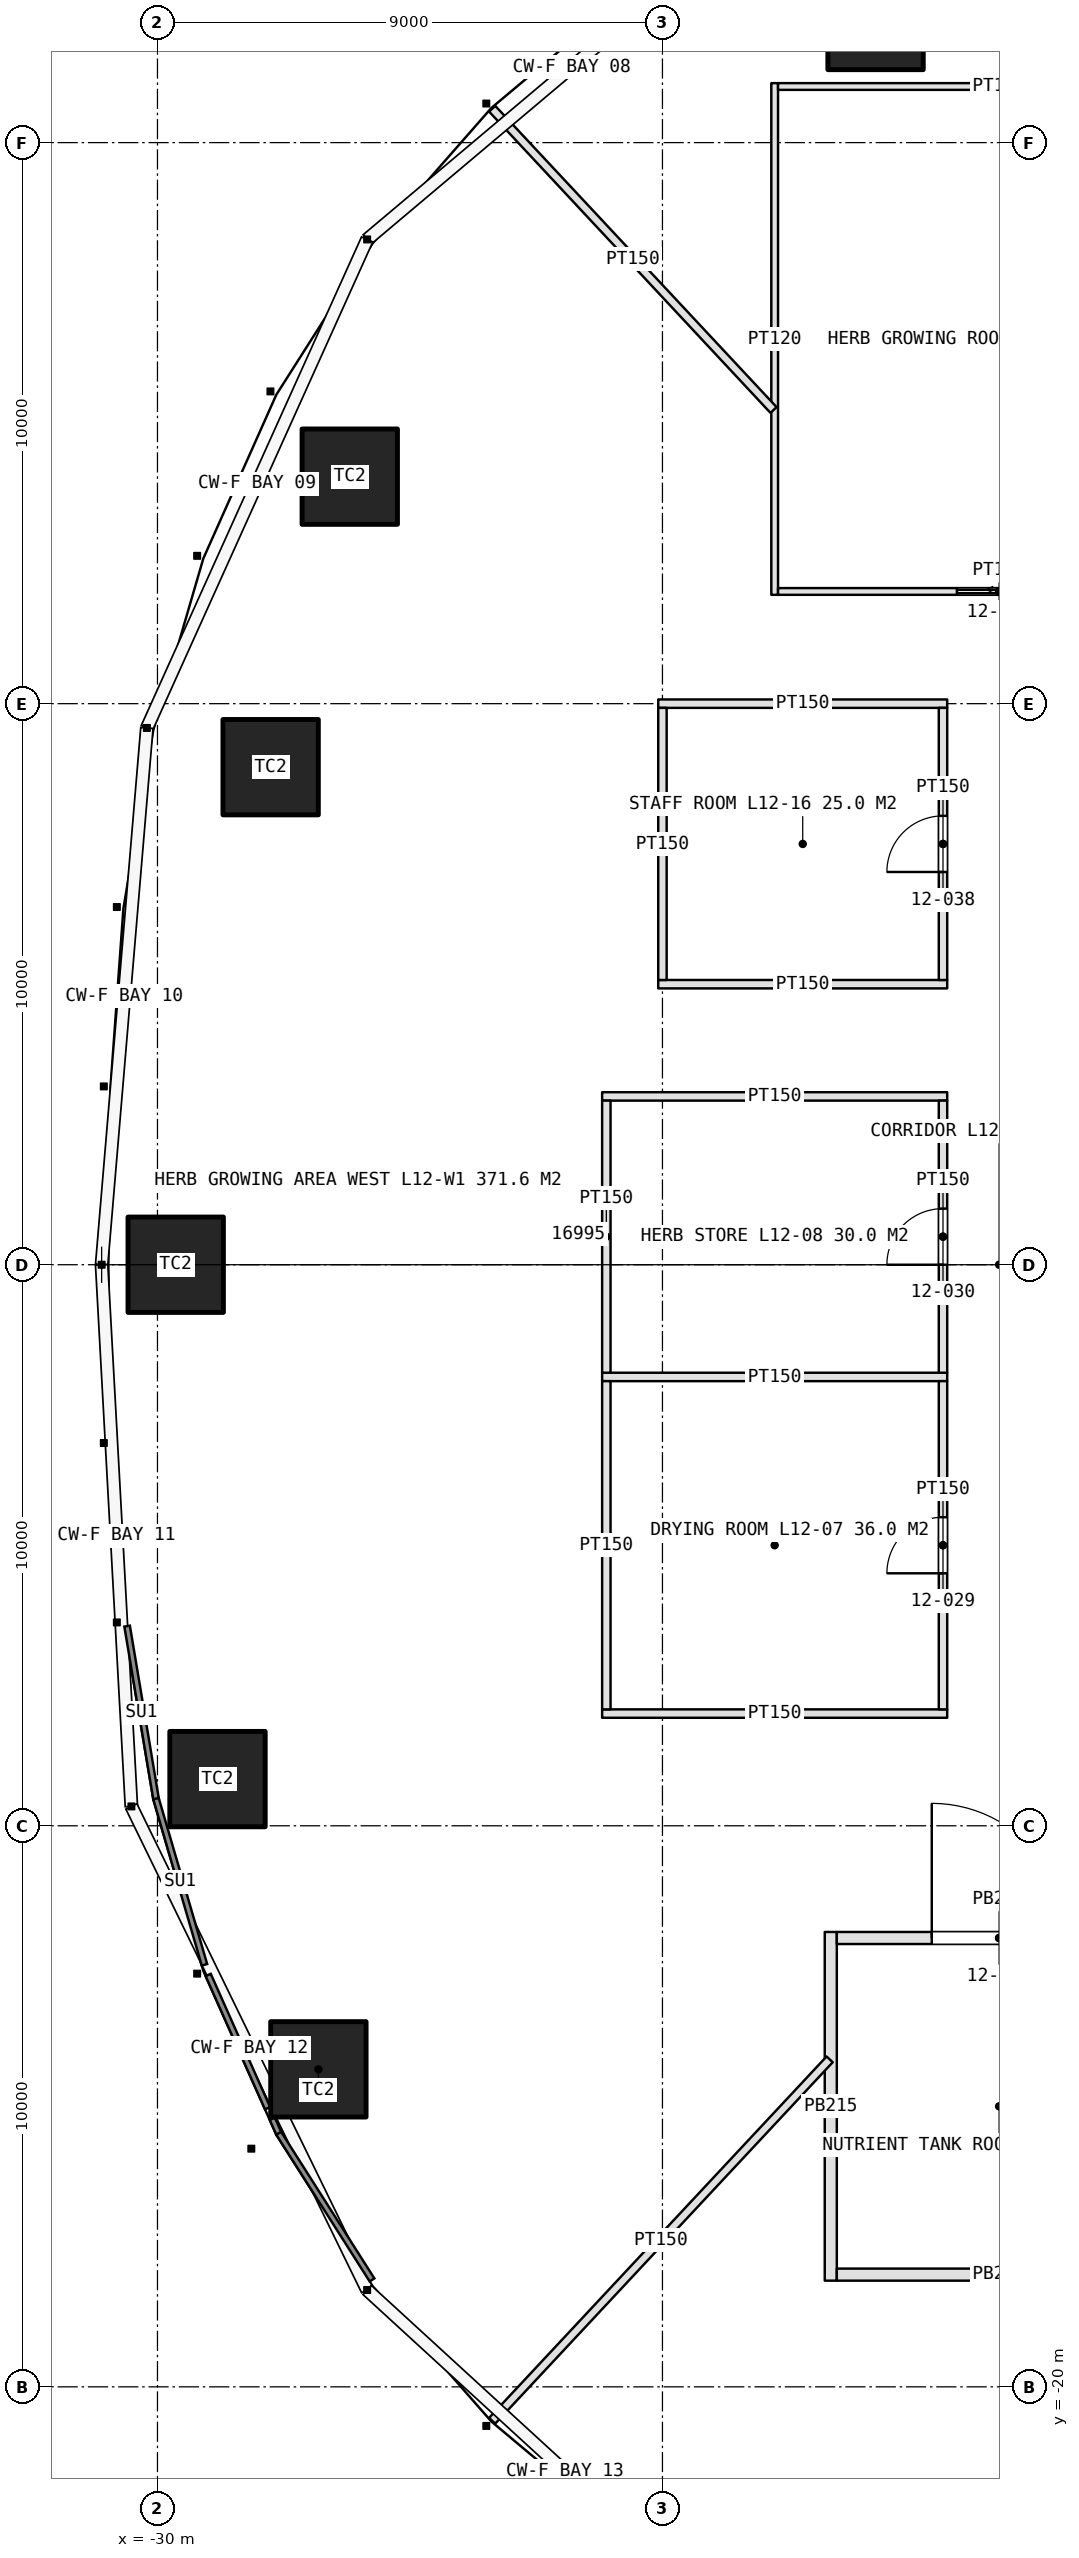
"""IFC4 building model, lengths in metres.
Left out: names, types, materials, properties, quantities, classifications, styles, units other than length and angle.
Written with IfcOpenShell. Run it as: python <this file> out.ifc"""

import sys

from ifc_helpers import new_model, si_unit, direction, frame, frame_2d, origin, origin_2d, place, context, subcontext, project, spatial, rectangle, extrude, element, fill, save


model = new_model("IFC4")
c1 = context("Model", 3, precision=1e-05, world=origin(), true_north=direction((0.0, 1.0)))
c2 = subcontext(c1, "Body", "Model", "MODEL_VIEW")
j1 = project(units=[si_unit("LENGTHUNIT", "METRE"), si_unit("PLANEANGLEUNIT", "RADIAN")], contexts=[c1])
p1 = place(None, origin())
s1 = spatial("IfcSite", under=j1, at=p1, CompositionType="ELEMENT")
p2 = place(p1, origin())
s2 = spatial("IfcBuilding", under=s1, at=p2, CompositionType="ELEMENT")
p3 = place(p2, frame((0.0, 0.0, 60.0)))
s3 = spatial("IfcBuildingStorey", under=s2, at=p3, CompositionType="ELEMENT", Elevation=60.0)
for number, where, z_axis, x_axis in (
    (1, (-17.202, 22.15, 0.0), (0.0, 0.0, 1.0), (1.0, 0.0, 0.0)),
    (2, (-26.573, 14.046, 0.0), (0.0, 0.0, 1.0), (1.0, 0.0, 0.0)),
    (3, (-27.983, 8.868, 0.0), (0.0, 0.0, 1.0), (1.0, 0.0, 0.0)),
    (4, (-29.675, 0.0, 0.0), (0.0, 0.0, 1.0), (1.0, 0.0, 0.0)),
    (5, (-28.93, -9.168, 0.0), (0.0, 0.0, 1.0), (1.0, 0.0, 0.0)),
    (6, (-27.132, -14.341, 0.0), (0.0, 0.0, 1.0), (1.0, 0.0, 0.0)),
):
    element("IfcColumn", number, at=place(p3, frame(where, z_axis=z_axis, x_axis=x_axis)), inside=s3, PredefinedType="COLUMN", context=c2, shape_type="SweptSolid", body=[
        extrude(rectangle(XDim=1.7, YDim=1.7, at=origin_2d()), origin(), (0.0, 0.0, 1.0), 5.0),
    ])
p4 = place(p3, frame((-19.0, 11.94, 0.0), z_axis=(0.0, 0.0, 1.0), x_axis=(0.0, 1.0, 0.0)))
e7 = element("IfcWall", 7, at=p4, inside=s3, PredefinedType="PARTITIONING", context=c2, shape_type="SweptSolid", body=[
    extrude(rectangle(XDim=9.12, YDim=0.12, at=frame_2d((4.56, 0.0))), origin(), (0.0, 0.0, 1.0), 3.6),
])
p5 = place(p3, frame((-18.94, 12.0, 0.0), z_axis=(0.0, 0.0, 1.0), x_axis=(1.0, 0.0, 0.0)))
e8 = element("IfcWall", 8, at=p5, inside=s3, PredefinedType="PARTITIONING", context=c2, shape_type="SweptSolid", body=[
    extrude(rectangle(XDim=7.88, YDim=0.12, at=frame_2d((3.94, 0.0))), origin(), (0.0, 0.0, 1.0), 3.6),
])
p6 = place(p5, frame((3.19, 0.0, 0.0)))
e9 = element("IfcOpeningElement", 9, at=p6, cuts=e8, PredefinedType="OPENING", context=c2, shape_type="SweptSolid", body=[
    extrude(rectangle(XDim=1.5, YDim=2.5, at=frame_2d((0.75, 1.25))), frame((0.0, 0.07, 0.0), z_axis=(0.0, -1.0, 0.0), x_axis=(1.0, 0.0, 0.0)), (0.0, 0.0, 1.0), 0.14),
])
p7 = place(p3, frame((-18.94, 21.0, 0.0), z_axis=(0.0, 0.0, 1.0), x_axis=(1.0, 0.0, 0.0)))
e10 = element("IfcWall", 10, at=p7, inside=s3, PredefinedType="PARTITIONING", context=c2, shape_type="SweptSolid", body=[
    extrude(rectangle(XDim=7.88, YDim=0.12, at=frame_2d((3.94, 0.0))), origin(), (0.0, 0.0, 1.0), 3.6),
])
for number, where, z_axis, x_axis in (
    (11, (-15.925, -8.0, 0.0), (0.0, 0.0, 1.0), (-1.0, 0.0, 0.0)),
    (12, (-15.925, -2.0, 0.0), (0.0, 0.0, 1.0), (-1.0, 0.0, 0.0)),
    (13, (-15.925, 3.0, 0.0), (0.0, 0.0, 1.0), (-1.0, 0.0, 0.0)),
):
    element("IfcWall", number, at=place(p3, frame(where, z_axis=z_axis, x_axis=x_axis)), inside=s3, PredefinedType="PARTITIONING", context=c2, shape_type="SweptSolid", body=[
        extrude(rectangle(XDim=6.15, YDim=0.15, at=frame_2d((3.075, 0.0))), origin(), (0.0, 0.0, 1.0), 3.6),
    ])
p8 = place(p3, frame((-16.0, -7.925, 0.0), z_axis=(0.0, 0.0, 1.0), x_axis=(0.0, 1.0, 0.0)))
e14 = element("IfcWall", 14, at=p8, inside=s3, PredefinedType="PARTITIONING", context=c2, shape_type="SweptSolid", body=[
    extrude(rectangle(XDim=5.85, YDim=0.15, at=frame_2d((2.925, 0.0))), origin(), (0.0, 0.0, 1.0), 3.6),
])
p9 = place(p8, frame((2.425, 0.0, 0.0)))
e15 = element("IfcOpeningElement", 15, at=p9, cuts=e14, PredefinedType="OPENING", context=c2, shape_type="SweptSolid", body=[
    extrude(rectangle(XDim=1.0, YDim=2.2, at=frame_2d((0.5, 1.1))), frame((0.0, 0.085, 0.0), z_axis=(0.0, -1.0, 0.0), x_axis=(1.0, 0.0, 0.0)), (0.0, 0.0, 1.0), 0.17),
])
p10 = place(p3, frame((-22.0, -7.925, 0.0), z_axis=(0.0, 0.0, 1.0), x_axis=(0.0, 1.0, 0.0)))
e16 = element("IfcWall", 16, at=p10, inside=s3, PredefinedType="PARTITIONING", context=c2, shape_type="SweptSolid", body=[
    extrude(rectangle(XDim=5.85, YDim=0.15, at=frame_2d((2.925, 0.0))), origin(), (0.0, 0.0, 1.0), 3.6),
])
p11 = place(p3, frame((-16.0, -1.925, 0.0), z_axis=(0.0, 0.0, 1.0), x_axis=(0.0, 1.0, 0.0)))
e17 = element("IfcWall", 17, at=p11, inside=s3, PredefinedType="PARTITIONING", context=c2, shape_type="SweptSolid", body=[
    extrude(rectangle(XDim=4.85, YDim=0.15, at=frame_2d((2.425, 0.0))), origin(), (0.0, 0.0, 1.0), 3.6),
])
p12 = place(p11, frame((1.925, 0.0, 0.0)))
e18 = element("IfcOpeningElement", 18, at=p12, cuts=e17, PredefinedType="OPENING", context=c2, shape_type="SweptSolid", body=[
    extrude(rectangle(XDim=1.0, YDim=2.2, at=frame_2d((0.5, 1.1))), frame((0.0, 0.085, 0.0), z_axis=(0.0, -1.0, 0.0), x_axis=(1.0, 0.0, 0.0)), (0.0, 0.0, 1.0), 0.17),
])
p13 = place(p3, frame((-22.0, -1.925, 0.0), z_axis=(0.0, 0.0, 1.0), x_axis=(0.0, 1.0, 0.0)))
e19 = element("IfcWall", 19, at=p13, inside=s3, PredefinedType="PARTITIONING", context=c2, shape_type="SweptSolid", body=[
    extrude(rectangle(XDim=4.85, YDim=0.15, at=frame_2d((2.425, 0.0))), origin(), (0.0, 0.0, 1.0), 3.6),
])
p14 = place(p3, frame((-18.0, -11.893, 0.0), z_axis=(0.0, 0.0, 1.0), x_axis=(0.0, -1.0, 0.0)))
e20 = element("IfcWall", 20, at=p14, inside=s3, PredefinedType="PARTITIONING", context=c2, shape_type="SweptSolid", body=[
    extrude(rectangle(XDim=6.215, YDim=0.215, at=frame_2d((3.107, 0.0))), origin(), (0.0, 0.0, 1.0), 3.6),
])
p15 = place(p3, frame((-17.893, -12.0, 0.0), z_axis=(0.0, 0.0, 1.0), x_axis=(1.0, 0.0, 0.0)))
e21 = element("IfcWall", 21, at=p15, inside=s3, PredefinedType="PARTITIONING", context=c2, shape_type="SweptSolid", body=[
    extrude(rectangle(XDim=5.785, YDim=0.215, at=frame_2d((2.893, 0.0))), origin(), (0.0, 0.0, 1.0), 3.6),
])
p16 = place(p15, frame((1.692, 0.0, 0.0)))
e22 = element("IfcOpeningElement", 22, at=p16, cuts=e21, PredefinedType="OPENING", context=c2, shape_type="SweptSolid", body=[
    extrude(rectangle(XDim=2.4, YDim=2.4, at=frame_2d((1.2, 1.2))), frame((0.0, 0.118, 0.0), z_axis=(0.0, -1.0, 0.0), x_axis=(1.0, 0.0, 0.0)), (0.0, 0.0, 1.0), 0.235),
])
p17 = place(p3, frame((-17.893, -18.0, 0.0), z_axis=(0.0, 0.0, 1.0), x_axis=(1.0, 0.0, 0.0)))
e23 = element("IfcWall", 23, at=p17, inside=s3, PredefinedType="PARTITIONING", context=c2, shape_type="SweptSolid", body=[
    extrude(rectangle(XDim=5.785, YDim=0.215, at=frame_2d((2.893, 0.0))), origin(), (0.0, 0.0, 1.0), 3.6),
])
for number, where, z_axis, x_axis in (
    (24, (-15.925, 5.0, 0.0), (0.0, 0.0, 1.0), (-1.0, 0.0, 0.0)),
    (25, (-15.925, 10.0, 0.0), (0.0, 0.0, 1.0), (-1.0, 0.0, 0.0)),
):
    element("IfcWall", number, at=place(p3, frame(where, z_axis=z_axis, x_axis=x_axis)), inside=s3, PredefinedType="PARTITIONING", context=c2, shape_type="SweptSolid", body=[
        extrude(rectangle(XDim=5.15, YDim=0.15, at=frame_2d((2.575, 0.0))), origin(), (0.0, 0.0, 1.0), 3.6),
    ])
p18 = place(p3, frame((-16.0, 5.075, 0.0), z_axis=(0.0, 0.0, 1.0), x_axis=(0.0, 1.0, 0.0)))
e26 = element("IfcWall", 26, at=p18, inside=s3, PredefinedType="PARTITIONING", context=c2, shape_type="SweptSolid", body=[
    extrude(rectangle(XDim=4.85, YDim=0.15, at=frame_2d((2.425, 0.0))), origin(), (0.0, 0.0, 1.0), 3.6),
])
p19 = place(p18, frame((1.925, 0.0, 0.0)))
e27 = element("IfcOpeningElement", 27, at=p19, cuts=e26, PredefinedType="OPENING", context=c2, shape_type="SweptSolid", body=[
    extrude(rectangle(XDim=1.0, YDim=2.2, at=frame_2d((0.5, 1.1))), frame((0.0, 0.085, 0.0), z_axis=(0.0, -1.0, 0.0), x_axis=(1.0, 0.0, 0.0)), (0.0, 0.0, 1.0), 0.17),
])
p20 = place(p3, frame((-21.0, 5.075, 0.0), z_axis=(0.0, 0.0, 1.0), x_axis=(0.0, 1.0, 0.0)))
e28 = element("IfcWall", 28, at=p20, inside=s3, PredefinedType="PARTITIONING", context=c2, shape_type="SweptSolid", body=[
    extrude(rectangle(XDim=4.85, YDim=0.15, at=frame_2d((2.425, 0.0))), origin(), (0.0, 0.0, 1.0), 3.6),
])
p21 = place(p3, frame((-18.02, -14.163, 0.0), z_axis=(0.0, 0.0, 1.0), x_axis=(-0.682521563847, -0.730865456075, 0.0)))
e29 = element("IfcWall", 29, at=p21, inside=s3, PredefinedType="PARTITIONING", context=c2, shape_type="SweptSolid", body=[
    extrude(rectangle(XDim=8.812, YDim=0.15, at=frame_2d((4.406, 0.0))), origin(), (0.0, 0.0, 1.0), 3.6),
])
p22 = place(p3, frame((-19.02, 15.234, 0.0), z_axis=(0.0, 0.0, 1.0), x_axis=(-0.682519491562, 0.730867391281, 0.0)))
e30 = element("IfcWall", 30, at=p22, inside=s3, PredefinedType="PARTITIONING", context=c2, shape_type="SweptSolid", body=[
    extrude(rectangle(XDim=7.347, YDim=0.15, at=frame_2d((3.674, 0.0))), origin(), (0.0, 0.0, 1.0), 3.6),
])
p23 = place(p6, origin())
e31 = element("IfcDoor", 31, at=p23, inside=s3, OperationType="SLIDING_TO_LEFT", PredefinedType="DOOR", context=c2, shape_type="SweptSolid", body=[
    extrude(rectangle(XDim=1.5, YDim=2.5, at=frame_2d((0.75, 1.25))), frame((0.0, 0.025, 0.0), z_axis=(0.0, -1.0, 0.0), x_axis=(1.0, 0.0, 0.0)), (0.0, 0.0, 1.0), 0.05),
])
fill(e9, e31)
p24 = place(p9, origin())
e32 = element("IfcDoor", 32, at=p24, inside=s3, OperationType="SINGLE_SWING_LEFT", PredefinedType="DOOR", context=c2, shape_type="SweptSolid", body=[
    extrude(rectangle(XDim=1.0, YDim=2.2, at=frame_2d((0.5, 1.1))), frame((0.0, 0.025, 0.0), z_axis=(0.0, -1.0, 0.0), x_axis=(1.0, 0.0, 0.0)), (0.0, 0.0, 1.0), 0.05),
])
fill(e15, e32)
p25 = place(p12, origin())
e33 = element("IfcDoor", 33, at=p25, inside=s3, OperationType="SINGLE_SWING_LEFT", PredefinedType="DOOR", context=c2, shape_type="SweptSolid", body=[
    extrude(rectangle(XDim=1.0, YDim=2.2, at=frame_2d((0.5, 1.1))), frame((0.0, 0.025, 0.0), z_axis=(0.0, -1.0, 0.0), x_axis=(1.0, 0.0, 0.0)), (0.0, 0.0, 1.0), 0.05),
])
fill(e18, e33)
p26 = place(p16, origin())
e34 = element("IfcDoor", 34, at=p26, inside=s3, OperationType="DOUBLE_DOOR_SINGLE_SWING", PredefinedType="DOOR", context=c2, shape_type="SweptSolid", body=[
    extrude(rectangle(XDim=2.4, YDim=2.4, at=frame_2d((1.2, 1.2))), frame((0.0, 0.025, 0.0), z_axis=(0.0, -1.0, 0.0), x_axis=(1.0, 0.0, 0.0)), (0.0, 0.0, 1.0), 0.05),
])
fill(e22, e34)
p27 = place(p19, origin())
e35 = element("IfcDoor", 35, at=p27, inside=s3, OperationType="SINGLE_SWING_LEFT", PredefinedType="DOOR", context=c2, shape_type="SweptSolid", body=[
    extrude(rectangle(XDim=1.0, YDim=2.2, at=frame_2d((0.5, 1.1))), frame((0.0, 0.025, 0.0), z_axis=(0.0, -1.0, 0.0), x_axis=(1.0, 0.0, 0.0)), (0.0, 0.0, 1.0), 0.05),
])
fill(e27, e35)
save(model, sys.argv[1])
